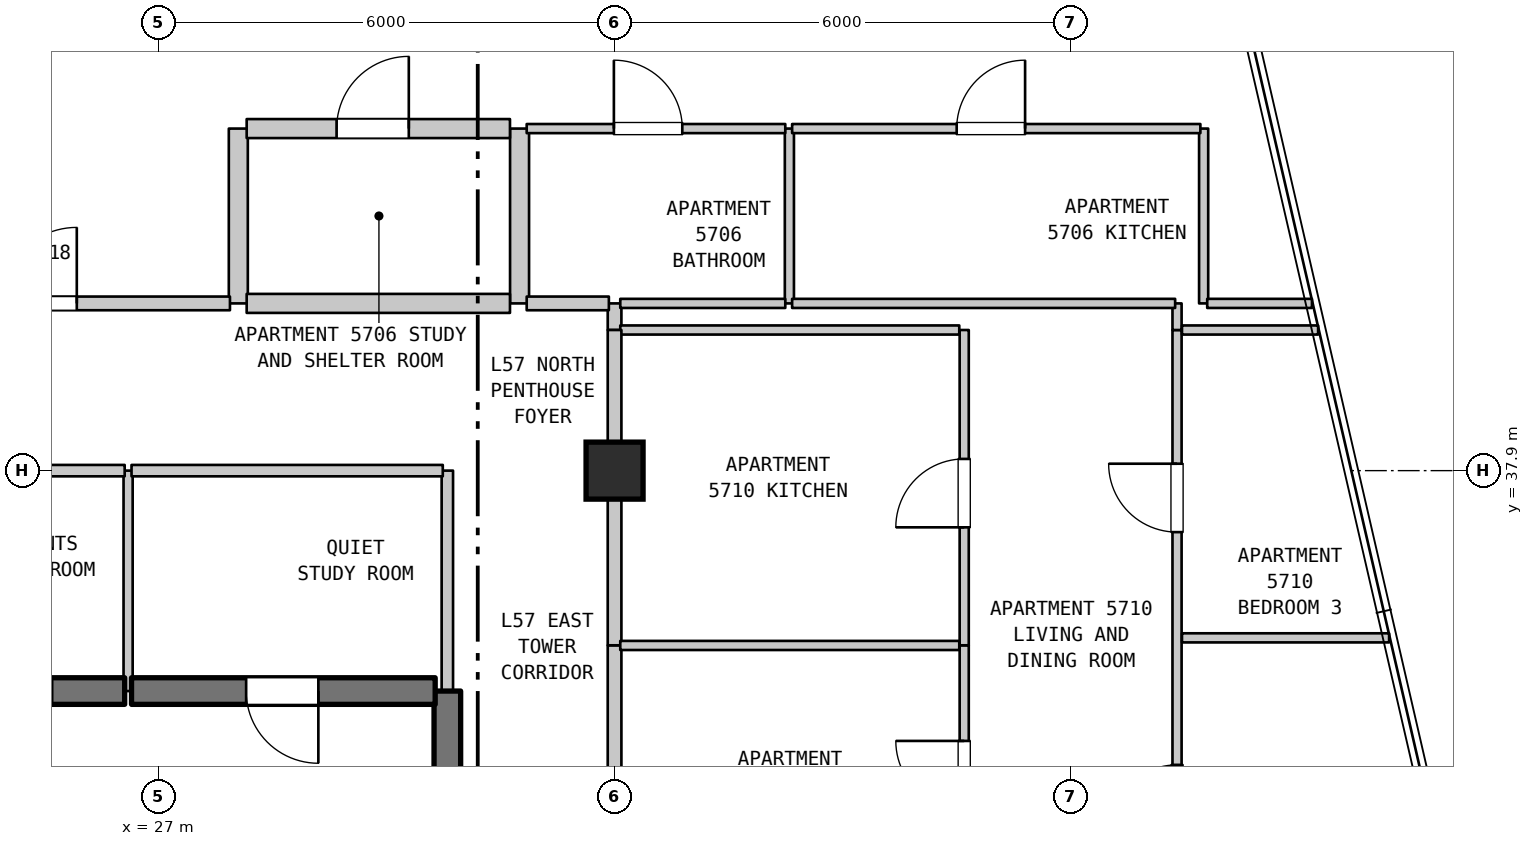
"""IFC4 building model, lengths in metres.
Left out: names, types, materials, properties, quantities, classifications, styles, units other than length and angle.
Written with IfcOpenShell. Run it as: python <this file> out.ifc"""

import sys

from ifc_helpers import new_model, si_unit, direction, frame, frame_2d, origin, origin_2d, place, context, subcontext, project, spatial, rectangle, extrude, element, fill, save


model = new_model("IFC4")
c1 = context("Model", 3, precision=1e-05, world=origin(), true_north=direction((0.0, 1.0)))
c2 = subcontext(c1, "Body", "Model", "MODEL_VIEW")
j1 = project(units=[si_unit("LENGTHUNIT", "METRE"), si_unit("PLANEANGLEUNIT", "RADIAN")], contexts=[c1])
p1 = place(None, origin())
s1 = spatial("IfcSite", under=j1, at=p1, CompositionType="ELEMENT")
p2 = place(p1, origin())
s2 = spatial("IfcBuilding", under=s1, at=p2, CompositionType="ELEMENT")
p3 = place(p2, frame((0.0, 0.0, 230.2)))
s3 = spatial("IfcBuildingStorey", under=s2, at=p3, CompositionType="ELEMENT", Elevation=230.2)
p4 = place(p3, frame((33.0, 37.9, 0.0), z_axis=(0.0, 0.0, 1.0), x_axis=(1.0, 0.0, 0.0)))
e1 = element("IfcColumn", 1, at=p4, inside=s3, PredefinedType="COLUMN", context=c2, shape_type="SweptSolid", body=[
    extrude(rectangle(XDim=0.75, YDim=0.75, at=origin_2d()), origin(), (0.0, 0.0, 1.0), 3.7),
])
p5 = place(p3, frame((26.6, 35.0, 0.0), z_axis=(0.0, 0.0, 1.0), x_axis=(0.0, 1.0, 0.0)))
e2 = element("IfcWall", 2, at=p5, inside=s3, PredefinedType="PARTITIONING", context=c2, shape_type="SweptSolid", body=[
    extrude(rectangle(XDim=2.9, YDim=0.12, at=frame_2d((1.45, 0.0))), origin(), (0.0, 0.0, 1.0), 3.39),
])
p6 = place(p3, frame((28.05, 40.1, 0.0), z_axis=(0.0, 0.0, 1.0), x_axis=(0.0, 1.0, 0.0)))
e3 = element("IfcWall", 3, at=p6, inside=s3, PredefinedType="STANDARD", context=c2, shape_type="SweptSolid", body=[
    extrude(rectangle(XDim=2.3, YDim=0.25, at=frame_2d((1.15, 0.0))), origin(), (0.0, 0.0, 1.0), 3.39),
])
p7 = place(p3, frame((30.8, 31.5, 0.0), z_axis=(0.0, 0.0, 1.0), x_axis=(0.0, 1.0, 0.0)))
e4 = element("IfcWall", 4, at=p7, inside=s3, PredefinedType="SHEAR", context=c2, shape_type="SweptSolid", body=[
    extrude(rectangle(XDim=3.5, YDim=0.35, at=frame_2d((1.75, 0.0))), origin(), (0.0, 0.0, 1.0), 3.39),
])
p8 = place(p7, frame((1.15, 0.0, 0.0)))
e5 = element("IfcOpeningElement", 5, at=p8, cuts=e4, PredefinedType="OPENING", context=c2, shape_type="SweptSolid", body=[
    extrude(rectangle(XDim=1.2, YDim=2.2, at=frame_2d((0.6, 1.1))), frame((0.0, 0.185, 0.0), z_axis=(0.0, -1.0, 0.0), x_axis=(1.0, 0.0, 0.0)), (0.0, 0.0, 1.0), 0.37),
])
p9 = place(p3, frame((30.8, 35.0, 0.0), z_axis=(0.0, 0.0, 1.0), x_axis=(0.0, 1.0, 0.0)))
e6 = element("IfcWall", 6, at=p9, inside=s3, PredefinedType="STANDARD", context=c2, shape_type="SweptSolid", body=[
    extrude(rectangle(XDim=2.9, YDim=0.15, at=frame_2d((1.45, 0.0))), origin(), (0.0, 0.0, 1.0), 3.39),
])
p10 = place(p3, frame((31.75, 40.1, 0.0), z_axis=(0.0, 0.0, 1.0), x_axis=(0.0, 1.0, 0.0)))
e7 = element("IfcWall", 7, at=p10, inside=s3, PredefinedType="STANDARD", context=c2, shape_type="SweptSolid", body=[
    extrude(rectangle(XDim=2.3, YDim=0.25, at=frame_2d((1.15, 0.0))), origin(), (0.0, 0.0, 1.0), 3.39),
])
p11 = place(p3, frame((33.0, 32.186, 0.0), z_axis=(0.0, 0.0, 1.0), x_axis=(0.0, 1.0, 0.0)))
e8 = element("IfcWall", 8, at=p11, inside=s3, PredefinedType="STANDARD", context=c2, shape_type="SweptSolid", body=[
    extrude(rectangle(XDim=3.416, YDim=0.18, at=frame_2d((1.708, 0.0))), origin(), (0.0, 0.0, 1.0), 2.89),
])
p12 = place(p3, frame((33.0, 35.602, 0.0), z_axis=(0.0, 0.0, 1.0), x_axis=(0.0, 1.0, 0.0)))
e9 = element("IfcWall", 9, at=p12, inside=s3, PredefinedType="STANDARD", context=c2, shape_type="SweptSolid", body=[
    extrude(rectangle(XDim=2.298, YDim=0.18, at=frame_2d((1.149, 0.0))), origin(), (0.0, 0.0, 1.0), 2.89),
])
p13 = place(p3, frame((33.0, 39.75, 0.0), z_axis=(0.0, 0.0, 1.0), x_axis=(0.0, 1.0, 0.0)))
e10 = element("IfcWall", 10, at=p13, inside=s3, PredefinedType="STANDARD", context=c2, shape_type="SweptSolid", body=[
    extrude(rectangle(XDim=0.35, YDim=0.18, at=frame_2d((0.175, 0.0))), origin(), (0.0, 0.0, 1.0), 3.39),
])
p14 = place(p3, frame((35.3, 40.1, 0.0), z_axis=(0.0, 0.0, 1.0), x_axis=(0.0, 1.0, 0.0)))
e11 = element("IfcWall", 11, at=p14, inside=s3, PredefinedType="PARTITIONING", context=c2, shape_type="SweptSolid", body=[
    extrude(rectangle(XDim=2.3, YDim=0.12, at=frame_2d((1.15, 0.0))), origin(), (0.0, 0.0, 1.0), 3.39),
])
p15 = place(p3, frame((37.6, 32.186, 0.0), z_axis=(0.0, 0.0, 1.0), x_axis=(0.0, 1.0, 0.0)))
e12 = element("IfcWall", 12, at=p15, inside=s3, PredefinedType="PARTITIONING", context=c2, shape_type="SweptSolid", body=[
    extrude(rectangle(XDim=3.416, YDim=0.12, at=frame_2d((1.708, 0.0))), origin(), (0.0, 0.0, 1.0), 3.39),
])
p16 = place(p15, frame((1.258, 0.0, 0.0)))
e13 = element("IfcOpeningElement", 13, at=p16, cuts=e12, PredefinedType="OPENING", context=c2, shape_type="SweptSolid", body=[
    extrude(rectangle(XDim=0.9, YDim=2.1, at=frame_2d((0.45, 1.05))), frame((0.0, 0.07, 0.0), z_axis=(0.0, -1.0, 0.0), x_axis=(1.0, 0.0, 0.0)), (0.0, 0.0, 1.0), 0.14),
])
p17 = place(p3, frame((37.6, 35.602, 0.0), z_axis=(0.0, 0.0, 1.0), x_axis=(0.0, 1.0, 0.0)))
e14 = element("IfcWall", 14, at=p17, inside=s3, PredefinedType="PARTITIONING", context=c2, shape_type="SweptSolid", body=[
    extrude(rectangle(XDim=4.148, YDim=0.12, at=frame_2d((2.074, 0.0))), origin(), (0.0, 0.0, 1.0), 3.39),
])
p18 = place(p17, frame((1.552, 0.0, 0.0)))
e15 = element("IfcOpeningElement", 15, at=p18, cuts=e14, PredefinedType="OPENING", context=c2, shape_type="SweptSolid", body=[
    extrude(rectangle(XDim=0.9, YDim=2.15, at=frame_2d((0.45, 1.075))), frame((0.0, 0.07, 0.0), z_axis=(0.0, -1.0, 0.0), x_axis=(1.0, 0.0, 0.0)), (0.0, 0.0, 1.0), 0.14),
])
p19 = place(p3, frame((40.4, 27.55, 0.0), z_axis=(0.0, 0.0, 1.0), x_axis=(0.0, 1.0, 0.0)))
e16 = element("IfcWall", 16, at=p19, inside=s3, PredefinedType="PARTITIONING", context=c2, shape_type="SweptSolid", body=[
    extrude(rectangle(XDim=12.2, YDim=0.12, at=frame_2d((6.1, 0.0))), origin(), (0.0, 0.0, 1.0), 3.39),
])
p20 = place(p19, frame((1.758, 0.0, 0.0)))
e17 = element("IfcOpeningElement", 17, at=p20, cuts=e16, PredefinedType="OPENING", context=c2, shape_type="SweptSolid", body=[
    extrude(rectangle(XDim=0.9, YDim=2.15, at=frame_2d((0.45, 1.075))), frame((0.0, 0.07, 0.0), z_axis=(0.0, -1.0, 0.0), x_axis=(1.0, 0.0, 0.0)), (0.0, 0.0, 1.0), 0.14),
])
p21 = place(p19, frame((5.579, 0.0, 0.0)))
e18 = element("IfcOpeningElement", 18, at=p21, cuts=e16, PredefinedType="OPENING", context=c2, shape_type="SweptSolid", body=[
    extrude(rectangle(XDim=0.9, YDim=2.15, at=frame_2d((0.45, 1.075))), frame((0.0, 0.07, 0.0), z_axis=(0.0, -1.0, 0.0), x_axis=(1.0, 0.0, 0.0)), (0.0, 0.0, 1.0), 0.14),
])
p22 = place(p19, frame((9.541, 0.0, 0.0)))
e19 = element("IfcOpeningElement", 19, at=p22, cuts=e16, PredefinedType="OPENING", context=c2, shape_type="SweptSolid", body=[
    extrude(rectangle(XDim=0.9, YDim=2.15, at=frame_2d((0.45, 1.075))), frame((0.0, 0.07, 0.0), z_axis=(0.0, -1.0, 0.0), x_axis=(1.0, 0.0, 0.0)), (0.0, 0.0, 1.0), 0.14),
])
p23 = place(p3, frame((40.4, 39.75, 0.0), z_axis=(0.0, 0.0, 1.0), x_axis=(0.0, 1.0, 0.0)))
e20 = element("IfcWall", 20, at=p23, inside=s3, PredefinedType="PARTITIONING", context=c2, shape_type="SweptSolid", body=[
    extrude(rectangle(XDim=0.35, YDim=0.12, at=frame_2d((0.175, 0.0))), origin(), (0.0, 0.0, 1.0), 3.39),
])
p24 = place(p3, frame((40.75, 40.1, 0.0), z_axis=(0.0, 0.0, 1.0), x_axis=(0.0, 1.0, 0.0)))
e21 = element("IfcWall", 21, at=p24, inside=s3, PredefinedType="PARTITIONING", context=c2, shape_type="SweptSolid", body=[
    extrude(rectangle(XDim=2.3, YDim=0.12, at=frame_2d((1.15, 0.0))), origin(), (0.0, 0.0, 1.0), 3.39),
])
p25 = place(p3, frame((23.96, 35.0, 0.0), z_axis=(0.0, 0.0, 1.0), x_axis=(1.0, 0.0, 0.0)))
e22 = element("IfcWall", 22, at=p25, inside=s3, PredefinedType="SHEAR", context=c2, shape_type="SweptSolid", body=[
    extrude(rectangle(XDim=2.595, YDim=0.35, at=frame_2d((1.297, 0.0))), origin(), (0.0, 0.0, 1.0), 3.39),
])
p26 = place(p25, frame((0.691, 0.0, 0.0)))
e23 = element("IfcOpeningElement", 23, at=p26, cuts=e22, PredefinedType="OPENING", context=c2, shape_type="SweptSolid", body=[
    extrude(rectangle(XDim=0.95, YDim=2.15, at=frame_2d((0.475, 1.075))), frame((0.0, 0.185, 0.0), z_axis=(0.0, -1.0, 0.0), x_axis=(1.0, 0.0, 0.0)), (0.0, 0.0, 1.0), 0.37),
])
p27 = place(p3, frame((26.645, 35.0, 0.0), z_axis=(0.0, 0.0, 1.0), x_axis=(1.0, 0.0, 0.0)))
e24 = element("IfcWall", 24, at=p27, inside=s3, PredefinedType="SHEAR", context=c2, shape_type="SweptSolid", body=[
    extrude(rectangle(XDim=3.995, YDim=0.35, at=frame_2d((1.998, 0.0))), origin(), (0.0, 0.0, 1.0), 3.39),
])
p28 = place(p27, frame((1.508, 0.0, 0.0)))
e25 = element("IfcOpeningElement", 25, at=p28, cuts=e24, PredefinedType="OPENING", context=c2, shape_type="SweptSolid", body=[
    extrude(rectangle(XDim=0.95, YDim=2.15, at=frame_2d((0.475, 1.075))), frame((0.0, 0.185, 0.0), z_axis=(0.0, -1.0, 0.0), x_axis=(1.0, 0.0, 0.0)), (0.0, 0.0, 1.0), 0.37),
])
p29 = place(p3, frame((33.075, 35.6, 0.0), z_axis=(0.0, 0.0, 1.0), x_axis=(1.0, 0.0, 0.0)))
e26 = element("IfcWall", 26, at=p29, inside=s3, PredefinedType="PARTITIONING", context=c2, shape_type="SweptSolid", body=[
    extrude(rectangle(XDim=4.46, YDim=0.12, at=frame_2d((2.23, 0.0))), origin(), (0.0, 0.0, 1.0), 3.39),
])
p30 = place(p3, frame((40.465, 35.7, 0.0), z_axis=(0.0, 0.0, 1.0), x_axis=(1.0, 0.0, 0.0)))
e27 = element("IfcWall", 27, at=p30, inside=s3, PredefinedType="PARTITIONING", context=c2, shape_type="SweptSolid", body=[
    extrude(rectangle(XDim=2.725, YDim=0.12, at=frame_2d((1.362, 0.0))), origin(), (0.0, 0.0, 1.0), 3.39),
])
p31 = place(p3, frame((23.96, 37.9, 0.0), z_axis=(0.0, 0.0, 1.0), x_axis=(1.0, 0.0, 0.0)))
e28 = element("IfcWall", 28, at=p31, inside=s3, PredefinedType="STANDARD", context=c2, shape_type="SweptSolid", body=[
    extrude(rectangle(XDim=2.595, YDim=0.15, at=frame_2d((1.297, 0.0))), origin(), (0.0, 0.0, 1.0), 2.89),
])
p32 = place(p3, frame((26.645, 37.9, 0.0), z_axis=(0.0, 0.0, 1.0), x_axis=(1.0, 0.0, 0.0)))
e29 = element("IfcWall", 29, at=p32, inside=s3, PredefinedType="STANDARD", context=c2, shape_type="SweptSolid", body=[
    extrude(rectangle(XDim=4.095, YDim=0.15, at=frame_2d((2.047, 0.0))), origin(), (0.0, 0.0, 1.0), 2.89),
])
p33 = place(p3, frame((33.075, 39.75, 0.0), z_axis=(0.0, 0.0, 1.0), x_axis=(1.0, 0.0, 0.0)))
e30 = element("IfcWall", 30, at=p33, inside=s3, PredefinedType="PARTITIONING", context=c2, shape_type="SweptSolid", body=[
    extrude(rectangle(XDim=4.46, YDim=0.12, at=frame_2d((2.23, 0.0))), origin(), (0.0, 0.0, 1.0), 3.39),
])
p34 = place(p3, frame((40.465, 39.75, 0.0), z_axis=(0.0, 0.0, 1.0), x_axis=(1.0, 0.0, 0.0)))
e31 = element("IfcWall", 31, at=p34, inside=s3, PredefinedType="PARTITIONING", context=c2, shape_type="SweptSolid", body=[
    extrude(rectangle(XDim=1.791, YDim=0.12, at=frame_2d((0.896, 0.0))), origin(), (0.0, 0.0, 1.0), 3.39),
])
p35 = place(p3, frame((22.845, 40.1, 0.0), z_axis=(0.0, 0.0, 1.0), x_axis=(1.0, 0.0, 0.0)))
e32 = element("IfcWall", 32, at=p35, inside=s3, PredefinedType="STANDARD", context=c2, shape_type="SweptSolid", body=[
    extrude(rectangle(XDim=5.095, YDim=0.18, at=frame_2d((2.547, 0.0))), origin(), (0.0, 0.0, 1.0), 3.39),
])
p36 = place(p35, frame((2.08, 0.0, 0.0)))
e33 = element("IfcOpeningElement", 33, at=p36, cuts=e32, PredefinedType="OPENING", context=c2, shape_type="SweptSolid", body=[
    extrude(rectangle(XDim=1.0, YDim=2.15, at=frame_2d((0.5, 1.075))), frame((0.0, 0.1, 0.0), z_axis=(0.0, -1.0, 0.0), x_axis=(1.0, 0.0, 0.0)), (0.0, 0.0, 1.0), 0.2),
])
p37 = place(p3, frame((28.16, 40.1, 0.0), z_axis=(0.0, 0.0, 1.0), x_axis=(1.0, 0.0, 0.0)))
e34 = element("IfcWall", 34, at=p37, inside=s3, PredefinedType="STANDARD", context=c2, shape_type="SweptSolid", body=[
    extrude(rectangle(XDim=3.464, YDim=0.25, at=frame_2d((1.732, 0.0))), origin(), (0.0, 0.0, 1.0), 3.39),
])
p38 = place(p3, frame((31.844, 40.1, 0.0), z_axis=(0.0, 0.0, 1.0), x_axis=(1.0, 0.0, 0.0)))
e35 = element("IfcWall", 35, at=p38, inside=s3, PredefinedType="STANDARD", context=c2, shape_type="SweptSolid", body=[
    extrude(rectangle(XDim=1.081, YDim=0.18, at=frame_2d((0.541, 0.0))), origin(), (0.0, 0.0, 1.0), 3.39),
])
p39 = place(p3, frame((33.075, 40.1, 0.0), z_axis=(0.0, 0.0, 1.0), x_axis=(1.0, 0.0, 0.0)))
e36 = element("IfcWall", 36, at=p39, inside=s3, PredefinedType="PARTITIONING", context=c2, shape_type="SweptSolid", body=[
    extrude(rectangle(XDim=2.171, YDim=0.12, at=frame_2d((1.085, 0.0))), origin(), (0.0, 0.0, 1.0), 3.39),
])
p40 = place(p3, frame((35.336, 40.1, 0.0), z_axis=(0.0, 0.0, 1.0), x_axis=(1.0, 0.0, 0.0)))
e37 = element("IfcWall", 37, at=p40, inside=s3, PredefinedType="PARTITIONING", context=c2, shape_type="SweptSolid", body=[
    extrude(rectangle(XDim=5.039, YDim=0.12, at=frame_2d((2.52, 0.0))), origin(), (0.0, 0.0, 1.0), 3.39),
])
p41 = place(p3, frame((40.797, 40.1, 0.0), z_axis=(0.0, 0.0, 1.0), x_axis=(1.0, 0.0, 0.0)))
e38 = element("IfcWall", 38, at=p41, inside=s3, PredefinedType="PARTITIONING", context=c2, shape_type="SweptSolid", body=[
    extrude(rectangle(XDim=1.378, YDim=0.12, at=frame_2d((0.689, 0.0))), origin(), (0.0, 0.0, 1.0), 3.39),
])
p42 = place(p3, frame((28.16, 42.4, 0.0), z_axis=(0.0, 0.0, 1.0), x_axis=(1.0, 0.0, 0.0)))
e39 = element("IfcWall", 39, at=p42, inside=s3, PredefinedType="STANDARD", context=c2, shape_type="SweptSolid", body=[
    extrude(rectangle(XDim=3.464, YDim=0.25, at=frame_2d((1.732, 0.0))), origin(), (0.0, 0.0, 1.0), 3.39),
])
p43 = place(p42, frame((1.183, 0.0, 0.0)))
e40 = element("IfcOpeningElement", 40, at=p43, cuts=e39, PredefinedType="OPENING", context=c2, shape_type="SweptSolid", body=[
    extrude(rectangle(XDim=0.95, YDim=2.15, at=frame_2d((0.475, 1.075))), frame((0.0, 0.135, 0.0), z_axis=(0.0, -1.0, 0.0), x_axis=(1.0, 0.0, 0.0)), (0.0, 0.0, 1.0), 0.27),
])
p44 = place(p3, frame((31.844, 42.4, 0.0), z_axis=(0.0, 0.0, 1.0), x_axis=(1.0, 0.0, 0.0)))
e41 = element("IfcWall", 41, at=p44, inside=s3, PredefinedType="PARTITIONING", context=c2, shape_type="SweptSolid", body=[
    extrude(rectangle(XDim=3.402, YDim=0.12, at=frame_2d((1.701, 0.0))), origin(), (0.0, 0.0, 1.0), 3.39),
])
p45 = place(p44, frame((1.147, 0.0, 0.0)))
e42 = element("IfcOpeningElement", 42, at=p45, cuts=e41, PredefinedType="OPENING", context=c2, shape_type="SweptSolid", body=[
    extrude(rectangle(XDim=0.9, YDim=2.1, at=frame_2d((0.45, 1.05))), frame((0.0, 0.07, 0.0), z_axis=(0.0, -1.0, 0.0), x_axis=(1.0, 0.0, 0.0)), (0.0, 0.0, 1.0), 0.14),
])
p46 = place(p3, frame((35.336, 42.4, 0.0), z_axis=(0.0, 0.0, 1.0), x_axis=(1.0, 0.0, 0.0)))
e43 = element("IfcWall", 43, at=p46, inside=s3, PredefinedType="PARTITIONING", context=c2, shape_type="SweptSolid", body=[
    extrude(rectangle(XDim=5.371, YDim=0.12, at=frame_2d((2.686, 0.0))), origin(), (0.0, 0.0, 1.0), 3.39),
])
p47 = place(p46, frame((2.165, 0.0, 0.0)))
e44 = element("IfcOpeningElement", 44, at=p47, cuts=e43, PredefinedType="OPENING", context=c2, shape_type="SweptSolid", body=[
    extrude(rectangle(XDim=0.9, YDim=2.15, at=frame_2d((0.45, 1.075))), frame((0.0, 0.07, 0.0), z_axis=(0.0, -1.0, 0.0), x_axis=(1.0, 0.0, 0.0)), (0.0, 0.0, 1.0), 0.14),
])
p48 = place(p3, frame((33.0, 37.9, 0.0), z_axis=(0.0, 0.0, 1.0), x_axis=(0.0, 1.0, 0.0)))
e45 = element("IfcWall", 45, at=p48, inside=s3, PredefinedType="STANDARD", context=c2, shape_type="SweptSolid", body=[
    extrude(rectangle(XDim=1.85, YDim=0.18, at=frame_2d((0.925, 0.0))), origin(), (0.0, 0.0, 1.0), 2.79),
])
p49 = place(p16, origin())
e46 = element("IfcDoor", 46, at=p49, inside=s3, OperationType="SINGLE_SWING_RIGHT", PredefinedType="DOOR", context=c2, shape_type="SweptSolid", body=[
    extrude(rectangle(XDim=0.9, YDim=2.1, at=frame_2d((0.45, 1.05))), frame((0.0, 0.025, 0.0), z_axis=(0.0, -1.0, 0.0), x_axis=(1.0, 0.0, 0.0)), (0.0, 0.0, 1.0), 0.05),
])
fill(e13, e46)
p50 = place(p18, origin())
e47 = element("IfcDoor", 47, at=p50, inside=s3, OperationType="SINGLE_SWING_LEFT", PredefinedType="DOOR", context=c2, shape_type="SweptSolid", body=[
    extrude(rectangle(XDim=0.9, YDim=2.15, at=frame_2d((0.45, 1.075))), frame((0.0, 0.025, 0.0), z_axis=(0.0, -1.0, 0.0), x_axis=(1.0, 0.0, 0.0)), (0.0, 0.0, 1.0), 0.05),
])
fill(e15, e47)
p51 = place(p21, origin())
e48 = element("IfcDoor", 48, at=p51, inside=s3, OperationType="SINGLE_SWING_LEFT", PredefinedType="DOOR", context=c2, shape_type="SweptSolid", body=[
    extrude(rectangle(XDim=0.9, YDim=2.15, at=frame_2d((0.45, 1.075))), frame((0.0, 0.025, 0.0), z_axis=(0.0, -1.0, 0.0), x_axis=(1.0, 0.0, 0.0)), (0.0, 0.0, 1.0), 0.05),
])
fill(e18, e48)
p52 = place(p22, origin())
e49 = element("IfcDoor", 49, at=p52, inside=s3, OperationType="SINGLE_SWING_RIGHT", PredefinedType="DOOR", context=c2, shape_type="SweptSolid", body=[
    extrude(rectangle(XDim=0.9, YDim=2.15, at=frame_2d((0.45, 1.075))), frame((0.0, 0.025, 0.0), z_axis=(0.0, -1.0, 0.0), x_axis=(1.0, 0.0, 0.0)), (0.0, 0.0, 1.0), 0.05),
])
fill(e19, e49)
p53 = place(p26, frame((0.95, 0.0, 0.0), z_axis=(0.0, 0.0, 1.0), x_axis=(-1.0, 0.0, 0.0)))
e50 = element("IfcDoor", 50, at=p53, inside=s3, OperationType="SINGLE_SWING_LEFT", PredefinedType="DOOR", context=c2, shape_type="SweptSolid", body=[
    extrude(rectangle(XDim=0.95, YDim=2.15, at=frame_2d((0.475, 1.075))), frame((0.0, 0.025, 0.0), z_axis=(0.0, -1.0, 0.0), x_axis=(1.0, 0.0, 0.0)), (0.0, 0.0, 1.0), 0.05),
])
fill(e23, e50)
p54 = place(p28, frame((0.95, 0.0, 0.0), z_axis=(0.0, 0.0, 1.0), x_axis=(-1.0, 0.0, 0.0)))
e51 = element("IfcDoor", 51, at=p54, inside=s3, OperationType="SINGLE_SWING_RIGHT", PredefinedType="DOOR", context=c2, shape_type="SweptSolid", body=[
    extrude(rectangle(XDim=0.95, YDim=2.15, at=frame_2d((0.475, 1.075))), frame((0.0, 0.025, 0.0), z_axis=(0.0, -1.0, 0.0), x_axis=(1.0, 0.0, 0.0)), (0.0, 0.0, 1.0), 0.05),
])
fill(e25, e51)
p55 = place(p36, origin())
e52 = element("IfcDoor", 52, at=p55, inside=s3, OperationType="SINGLE_SWING_RIGHT", PredefinedType="DOOR", context=c2, shape_type="SweptSolid", body=[
    extrude(rectangle(XDim=1.0, YDim=2.15, at=frame_2d((0.5, 1.075))), frame((0.0, 0.025, 0.0), z_axis=(0.0, -1.0, 0.0), x_axis=(1.0, 0.0, 0.0)), (0.0, 0.0, 1.0), 0.05),
])
fill(e33, e52)
p56 = place(p43, origin())
e53 = element("IfcDoor", 53, at=p56, inside=s3, OperationType="SINGLE_SWING_RIGHT", PredefinedType="DOOR", context=c2, shape_type="SweptSolid", body=[
    extrude(rectangle(XDim=0.95, YDim=2.15, at=frame_2d((0.475, 1.075))), frame((0.0, 0.025, 0.0), z_axis=(0.0, -1.0, 0.0), x_axis=(1.0, 0.0, 0.0)), (0.0, 0.0, 1.0), 0.05),
])
fill(e40, e53)
p57 = place(p45, origin())
e54 = element("IfcDoor", 54, at=p57, inside=s3, OperationType="SINGLE_SWING_LEFT", PredefinedType="DOOR", context=c2, shape_type="SweptSolid", body=[
    extrude(rectangle(XDim=0.9, YDim=2.1, at=frame_2d((0.45, 1.05))), frame((0.0, 0.025, 0.0), z_axis=(0.0, -1.0, 0.0), x_axis=(1.0, 0.0, 0.0)), (0.0, 0.0, 1.0), 0.05),
])
fill(e42, e54)
p58 = place(p47, origin())
e55 = element("IfcDoor", 55, at=p58, inside=s3, OperationType="SINGLE_SWING_RIGHT", PredefinedType="DOOR", context=c2, shape_type="SweptSolid", body=[
    extrude(rectangle(XDim=0.9, YDim=2.15, at=frame_2d((0.45, 1.075))), frame((0.0, 0.025, 0.0), z_axis=(0.0, -1.0, 0.0), x_axis=(1.0, 0.0, 0.0)), (0.0, 0.0, 1.0), 0.05),
])
fill(e44, e55)
save(model, sys.argv[1])
